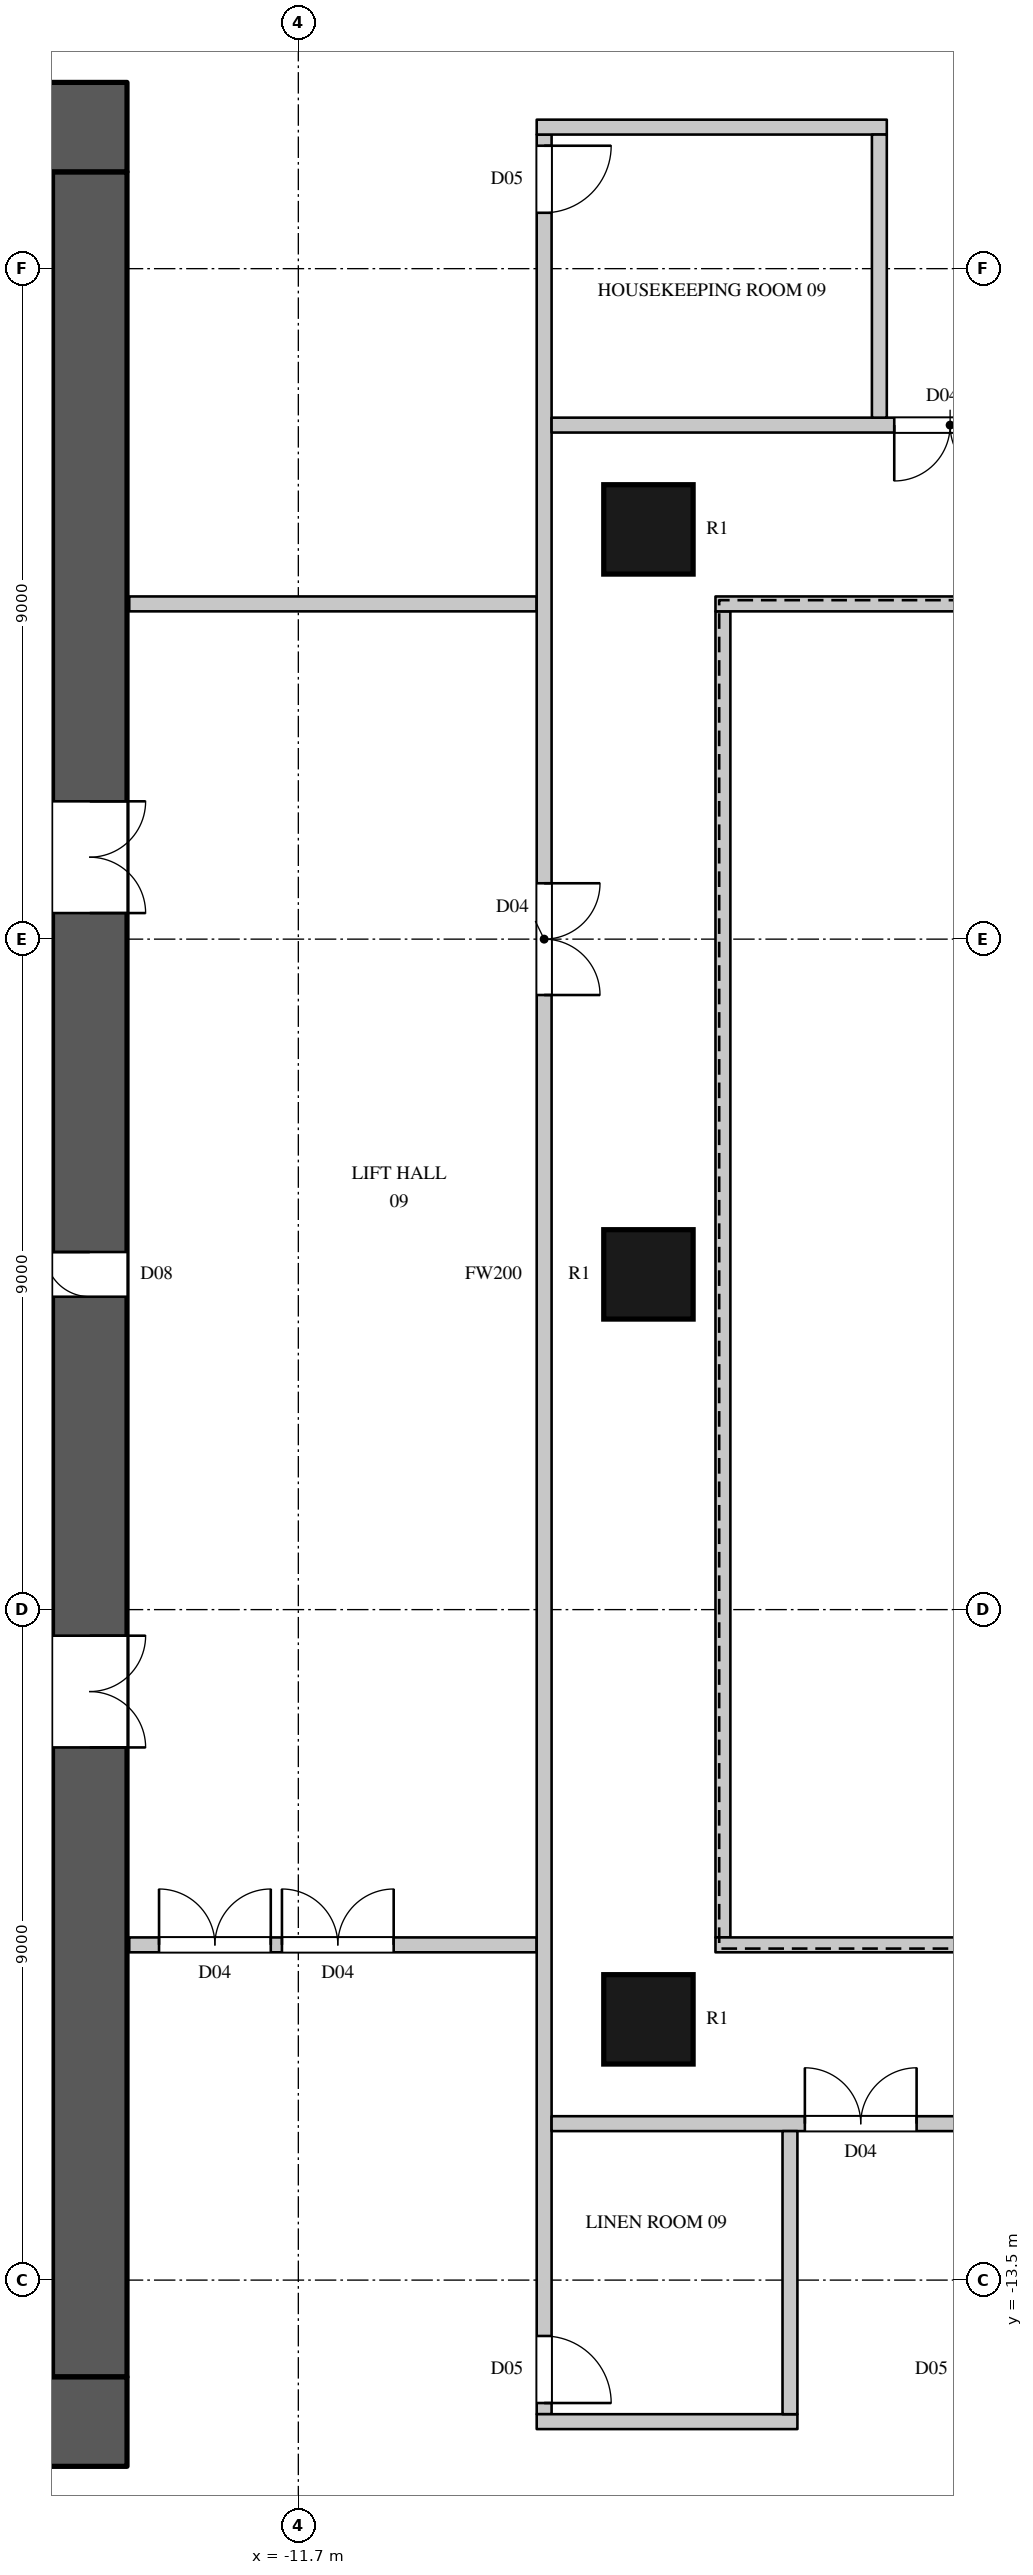
"""IFC4 building model, lengths in metres.
Left out: names, types, materials, properties, quantities, classifications, styles, units other than length and angle.
Written with IfcOpenShell. Run it as: python <this file> out.ifc"""

import sys

from ifc_helpers import new_model, si_unit, direction, frame, frame_2d, origin, origin_2d, place, context, subcontext, project, spatial, rectangle, circle, extrude, element, fill, save


model = new_model("IFC4")
c1 = context("Model", 3, precision=1e-05, world=origin(), true_north=direction((0.0, 1.0)))
c2 = subcontext(c1, "Body", "Model", "MODEL_VIEW")
j1 = project(units=[si_unit("LENGTHUNIT", "METRE"), si_unit("PLANEANGLEUNIT", "RADIAN")], contexts=[c1])
p1 = place(None, origin())
s1 = spatial("IfcSite", under=j1, at=p1, CompositionType="ELEMENT")
p2 = place(p1, origin())
s2 = spatial("IfcBuilding", under=s1, at=p2, CompositionType="ELEMENT")
p3 = place(p2, frame((0.0, 0.0, 62.7)))
s3 = spatial("IfcBuildingStorey", under=s2, at=p3, CompositionType="ELEMENT", Elevation=62.7)
for number, where, z_axis, x_axis in (
    (1, (-7.0, -10.0, 0.0), (0.0, 0.0, 1.0), (1.0, 0.0, 0.0)),
    (2, (-7.0, 0.0, 0.0), (0.0, 0.0, 1.0), (1.0, 0.0, 0.0)),
    (3, (-7.0, 10.0, 0.0), (0.0, 0.0, 1.0), (1.0, 0.0, 0.0)),
):
    element("IfcColumn", number, at=place(p3, frame(where, z_axis=z_axis, x_axis=x_axis)), inside=s3, PredefinedType="COLUMN", context=c2, shape_type="SweptSolid", body=[
        extrude(circle(Radius=0.6, at=origin_2d()), origin(), (0.0, 0.0, 1.0), 3.6),
    ])
p4 = place(p3, frame((-30.0, 15.4, 0.0), z_axis=(0.0, 0.0, 1.0), x_axis=(1.0, 0.0, 0.0)))
e4 = element("IfcWall", 4, at=p4, inside=s3, PredefinedType="SHEAR", context=c2, shape_type="SweptSolid", body=[
    extrude(rectangle(XDim=16.0, YDim=1.2, at=frame_2d((8.0, 0.0))), origin(), (0.0, 0.0, 1.0), 3.6),
])
p5 = place(p4, frame((13.4, 0.0, 0.0)))
e5 = element("IfcOpeningElement", 5, at=p5, cuts=e4, PredefinedType="OPENING", context=c2, shape_type="SweptSolid", body=[
    extrude(rectangle(XDim=1.5, YDim=2.4, at=frame_2d((0.75, 1.2))), frame((0.0, 0.61, 0.0), z_axis=(0.0, -1.0, 0.0), x_axis=(1.0, 0.0, 0.0)), (0.0, 0.0, 1.0), 1.22),
])
p6 = place(p3, frame((-30.0, -15.4, 0.0), z_axis=(0.0, 0.0, 1.0), x_axis=(1.0, 0.0, 0.0)))
e6 = element("IfcWall", 6, at=p6, inside=s3, PredefinedType="SHEAR", context=c2, shape_type="SweptSolid", body=[
    extrude(rectangle(XDim=16.0, YDim=1.2, at=frame_2d((8.0, 0.0))), origin(), (0.0, 0.0, 1.0), 3.6),
])
p7 = place(p6, frame((13.4, 0.0, 0.0)))
e7 = element("IfcOpeningElement", 7, at=p7, cuts=e6, PredefinedType="OPENING", context=c2, shape_type="SweptSolid", body=[
    extrude(rectangle(XDim=1.5, YDim=2.4, at=frame_2d((0.75, 1.2))), frame((0.0, 0.61, 0.0), z_axis=(0.0, -1.0, 0.0), x_axis=(1.0, 0.0, 0.0)), (0.0, 0.0, 1.0), 1.22),
])
p8 = place(p3, frame((-14.5, -14.8, 0.0), z_axis=(0.0, 0.0, 1.0), x_axis=(0.0, 1.0, 0.0)))
e8 = element("IfcWall", 8, at=p8, inside=s3, PredefinedType="SHEAR", context=c2, shape_type="SweptSolid", body=[
    extrude(rectangle(XDim=29.6, YDim=1.0, at=frame_2d((14.8, 0.0))), origin(), (0.0, 0.0, 1.0), 3.6),
])
p9 = place(p8, frame((8.45, 0.0, 0.0)))
e9 = element("IfcOpeningElement", 9, at=p9, cuts=e8, PredefinedType="OPENING", context=c2, shape_type="SweptSolid", body=[
    extrude(rectangle(XDim=1.5, YDim=2.4, at=frame_2d((0.75, 1.2))), frame((0.0, 0.51, 0.0), z_axis=(0.0, -1.0, 0.0), x_axis=(1.0, 0.0, 0.0)), (0.0, 0.0, 1.0), 1.02),
])
p10 = place(p8, frame((19.65, 0.0, 0.0)))
e10 = element("IfcOpeningElement", 10, at=p10, cuts=e8, PredefinedType="OPENING", context=c2, shape_type="SweptSolid", body=[
    extrude(rectangle(XDim=1.5, YDim=2.4, at=frame_2d((0.75, 1.2))), frame((0.0, 0.51, 0.0), z_axis=(0.0, -1.0, 0.0), x_axis=(1.0, 0.0, 0.0)), (0.0, 0.0, 1.0), 1.02),
])
p11 = place(p8, frame((14.5, 0.0, 0.0)))
e11 = element("IfcOpeningElement", 11, at=p11, cuts=e8, PredefinedType="OPENING", context=c2, shape_type="SweptSolid", body=[
    extrude(rectangle(XDim=0.6, YDim=2.0, at=frame_2d((0.3, 1.0))), frame((0.0, 0.51, 0.0), z_axis=(0.0, -1.0, 0.0), x_axis=(1.0, 0.0, 0.0)), (0.0, 0.0, 1.0), 1.02),
])
p12 = place(p3, frame((-13.97, -9.0, 0.0), z_axis=(0.0, 0.0, 1.0), x_axis=(1.0, 0.0, 0.0)))
e12 = element("IfcWall", 12, at=p12, inside=s3, PredefinedType="PARTITIONING", context=c2, shape_type="SweptSolid", body=[
    extrude(rectangle(XDim=5.47, YDim=0.2, at=frame_2d((2.735, 0.0))), origin(), (0.0, 0.0, 1.0), 3.3),
])
p13 = place(p12, frame((0.4, 0.0, 0.0)))
e13 = element("IfcOpeningElement", 13, at=p13, cuts=e12, PredefinedType="OPENING", context=c2, shape_type="SweptSolid", body=[
    extrude(rectangle(XDim=1.5, YDim=2.2, at=frame_2d((0.75, 1.1))), frame((0.0, 0.11, 0.0), z_axis=(0.0, -1.0, 0.0), x_axis=(1.0, 0.0, 0.0)), (0.0, 0.0, 1.0), 0.22),
])
p14 = place(p12, frame((2.05, 0.0, 0.0)))
e14 = element("IfcOpeningElement", 14, at=p14, cuts=e12, PredefinedType="OPENING", context=c2, shape_type="SweptSolid", body=[
    extrude(rectangle(XDim=1.5, YDim=2.2, at=frame_2d((0.75, 1.1))), frame((0.0, 0.11, 0.0), z_axis=(0.0, -1.0, 0.0), x_axis=(1.0, 0.0, 0.0)), (0.0, 0.0, 1.0), 0.22),
])
p15 = place(p3, frame((-13.97, 9.0, 0.0), z_axis=(0.0, 0.0, 1.0), x_axis=(1.0, 0.0, 0.0)))
e15 = element("IfcWall", 15, at=p15, inside=s3, PredefinedType="PARTITIONING", context=c2, shape_type="SweptSolid", body=[
    extrude(rectangle(XDim=5.47, YDim=0.2, at=frame_2d((2.735, 0.0))), origin(), (0.0, 0.0, 1.0), 3.3),
])
p16 = place(p3, frame((-8.4, -15.3, 0.0), z_axis=(0.0, 0.0, 1.0), x_axis=(0.0, 1.0, 0.0)))
e16 = element("IfcWall", 16, at=p16, inside=s3, PredefinedType="PARTITIONING", context=c2, shape_type="SweptSolid", body=[
    extrude(rectangle(XDim=30.6, YDim=0.2, at=frame_2d((15.3, 0.0))), origin(), (0.0, 0.0, 1.0), 3.3),
])
p17 = place(p16, frame((19.05, 0.0, 0.0)))
e17 = element("IfcOpeningElement", 17, at=p17, cuts=e16, PredefinedType="OPENING", context=c2, shape_type="SweptSolid", body=[
    extrude(rectangle(XDim=1.5, YDim=2.2, at=frame_2d((0.75, 1.1))), frame((0.0, 0.11, 0.0), z_axis=(0.0, -1.0, 0.0), x_axis=(1.0, 0.0, 0.0)), (0.0, 0.0, 1.0), 0.22),
])
p18 = place(p16, frame((29.55, 0.0, 0.0)))
e18 = element("IfcOpeningElement", 18, at=p18, cuts=e16, PredefinedType="OPENING", context=c2, shape_type="SweptSolid", body=[
    extrude(rectangle(XDim=0.9, YDim=2.2, at=frame_2d((0.45, 1.1))), frame((0.0, 0.11, 0.0), z_axis=(0.0, -1.0, 0.0), x_axis=(1.0, 0.0, 0.0)), (0.0, 0.0, 1.0), 0.22),
])
p19 = place(p16, frame((0.15, 0.0, 0.0)))
e19 = element("IfcOpeningElement", 19, at=p19, cuts=e16, PredefinedType="OPENING", context=c2, shape_type="SweptSolid", body=[
    extrude(rectangle(XDim=0.9, YDim=2.2, at=frame_2d((0.45, 1.1))), frame((0.0, 0.11, 0.0), z_axis=(0.0, -1.0, 0.0), x_axis=(1.0, 0.0, 0.0)), (0.0, 0.0, 1.0), 0.22),
])
p20 = place(p3, frame((-8.5, -15.4, 0.0), z_axis=(0.0, 0.0, 1.0), x_axis=(1.0, 0.0, 0.0)))
e20 = element("IfcWall", 20, at=p20, inside=s3, PredefinedType="PARTITIONING", context=c2, shape_type="SweptSolid", body=[
    extrude(rectangle(XDim=3.5, YDim=0.2, at=frame_2d((1.75, 0.0))), origin(), (0.0, 0.0, 1.0), 3.3),
])
p21 = place(p3, frame((-8.3, -11.4, 0.0), z_axis=(0.0, 0.0, 1.0), x_axis=(1.0, 0.0, 0.0)))
e21 = element("IfcWall", 21, at=p21, inside=s3, PredefinedType="PARTITIONING", context=c2, shape_type="SweptSolid", body=[
    extrude(rectangle(XDim=18.7, YDim=0.2, at=frame_2d((9.35, 0.0))), origin(), (0.0, 0.0, 1.0), 3.3),
])
p22 = place(p21, frame((3.4, 0.0, 0.0)))
e22 = element("IfcOpeningElement", 22, at=p22, cuts=e21, PredefinedType="OPENING", context=c2, shape_type="SweptSolid", body=[
    extrude(rectangle(XDim=1.5, YDim=2.2, at=frame_2d((0.75, 1.1))), frame((0.0, 0.11, 0.0), z_axis=(0.0, -1.0, 0.0), x_axis=(1.0, 0.0, 0.0)), (0.0, 0.0, 1.0), 0.22),
])
p23 = place(p3, frame((-8.3, 11.4, 0.0), z_axis=(0.0, 0.0, 1.0), x_axis=(1.0, 0.0, 0.0)))
e23 = element("IfcWall", 23, at=p23, inside=s3, PredefinedType="PARTITIONING", context=c2, shape_type="SweptSolid", body=[
    extrude(rectangle(XDim=18.7, YDim=0.2, at=frame_2d((9.35, 0.0))), origin(), (0.0, 0.0, 1.0), 3.3),
])
p24 = place(p23, frame((4.6, 0.0, 0.0)))
e24 = element("IfcOpeningElement", 24, at=p24, cuts=e23, PredefinedType="OPENING", context=c2, shape_type="SweptSolid", body=[
    extrude(rectangle(XDim=1.5, YDim=2.2, at=frame_2d((0.75, 1.1))), frame((0.0, 0.11, 0.0), z_axis=(0.0, -1.0, 0.0), x_axis=(1.0, 0.0, 0.0)), (0.0, 0.0, 1.0), 0.22),
])
p25 = place(p3, frame((-8.5, 15.4, 0.0), z_axis=(0.0, 0.0, 1.0), x_axis=(1.0, 0.0, 0.0)))
e25 = element("IfcWall", 25, at=p25, inside=s3, PredefinedType="PARTITIONING", context=c2, shape_type="SweptSolid", body=[
    extrude(rectangle(XDim=4.7, YDim=0.2, at=frame_2d((2.35, 0.0))), origin(), (0.0, 0.0, 1.0), 3.3),
])
p26 = place(p3, frame((-6.0, -8.9, 0.0), z_axis=(0.0, 0.0, 1.0), x_axis=(0.0, 1.0, 0.0)))
e26 = element("IfcWall", 26, at=p26, inside=s3, PredefinedType="PARTITIONING", context=c2, shape_type="SweptSolid", body=[
    extrude(rectangle(XDim=17.8, YDim=0.2, at=frame_2d((8.9, 0.0))), origin(), (0.0, 0.0, 1.0), 3.3),
])
for number, where, z_axis, x_axis in (
    (27, (-6.1, -9.0, 0.0), (0.0, 0.0, 1.0), (1.0, 0.0, 0.0)),
    (28, (-6.1, 9.0, 0.0), (0.0, 0.0, 1.0), (1.0, 0.0, 0.0)),
):
    element("IfcWall", number, at=place(p3, frame(where, z_axis=z_axis, x_axis=x_axis)), inside=s3, PredefinedType="PARTITIONING", context=c2, shape_type="SweptSolid", body=[
        extrude(rectangle(XDim=14.2, YDim=0.2, at=frame_2d((7.1, 0.0))), origin(), (0.0, 0.0, 1.0), 3.3),
    ])
for number, where, z_axis, x_axis in (
    (29, (-5.1, -15.3, 0.0), (0.0, 0.0, 1.0), (0.0, 1.0, 0.0)),
    (30, (-3.9, 11.5, 0.0), (0.0, 0.0, 1.0), (0.0, 1.0, 0.0)),
):
    element("IfcWall", number, at=place(p3, frame(where, z_axis=z_axis, x_axis=x_axis)), inside=s3, PredefinedType="PARTITIONING", context=c2, shape_type="SweptSolid", body=[
        extrude(rectangle(XDim=3.8, YDim=0.2, at=frame_2d((1.9, 0.0))), origin(), (0.0, 0.0, 1.0), 3.3),
    ])
p27 = place(p17, origin())
e31 = element("IfcDoor", 31, at=p27, inside=s3, OperationType="DOUBLE_DOOR_SINGLE_SWING", PredefinedType="DOOR", context=c2, shape_type="SweptSolid", body=[
    extrude(rectangle(XDim=1.5, YDim=2.2, at=frame_2d((0.75, 1.1))), frame((0.0, 0.025, 0.0), z_axis=(0.0, -1.0, 0.0), x_axis=(1.0, 0.0, 0.0)), (0.0, 0.0, 1.0), 0.05),
])
fill(e17, e31)
p28 = place(p13, origin())
e32 = element("IfcDoor", 32, at=p28, inside=s3, OperationType="DOUBLE_DOOR_SINGLE_SWING", PredefinedType="DOOR", context=c2, shape_type="SweptSolid", body=[
    extrude(rectangle(XDim=1.5, YDim=2.2, at=frame_2d((0.75, 1.1))), frame((0.0, 0.025, 0.0), z_axis=(0.0, -1.0, 0.0), x_axis=(1.0, 0.0, 0.0)), (0.0, 0.0, 1.0), 0.05),
])
fill(e13, e32)
p29 = place(p14, origin())
e33 = element("IfcDoor", 33, at=p29, inside=s3, OperationType="DOUBLE_DOOR_SINGLE_SWING", PredefinedType="DOOR", context=c2, shape_type="SweptSolid", body=[
    extrude(rectangle(XDim=1.5, YDim=2.2, at=frame_2d((0.75, 1.1))), frame((0.0, 0.025, 0.0), z_axis=(0.0, -1.0, 0.0), x_axis=(1.0, 0.0, 0.0)), (0.0, 0.0, 1.0), 0.05),
])
fill(e14, e33)
p30 = place(p22, origin())
e34 = element("IfcDoor", 34, at=p30, inside=s3, OperationType="DOUBLE_DOOR_SINGLE_SWING", PredefinedType="DOOR", context=c2, shape_type="SweptSolid", body=[
    extrude(rectangle(XDim=1.5, YDim=2.2, at=frame_2d((0.75, 1.1))), frame((0.0, 0.025, 0.0), z_axis=(0.0, -1.0, 0.0), x_axis=(1.0, 0.0, 0.0)), (0.0, 0.0, 1.0), 0.05),
])
fill(e22, e34)
p31 = place(p24, origin())
e35 = element("IfcDoor", 35, at=p31, inside=s3, OperationType="DOUBLE_DOOR_SINGLE_SWING", PredefinedType="DOOR", context=c2, shape_type="SweptSolid", body=[
    extrude(rectangle(XDim=1.5, YDim=2.2, at=frame_2d((0.75, 1.1))), frame((0.0, 0.025, 0.0), z_axis=(0.0, -1.0, 0.0), x_axis=(1.0, 0.0, 0.0)), (0.0, 0.0, 1.0), 0.05),
])
fill(e24, e35)
p32 = place(p18, origin())
e36 = element("IfcDoor", 36, at=p32, inside=s3, OperationType="SINGLE_SWING_LEFT", PredefinedType="DOOR", context=c2, shape_type="SweptSolid", body=[
    extrude(rectangle(XDim=0.9, YDim=2.2, at=frame_2d((0.45, 1.1))), frame((0.0, 0.025, 0.0), z_axis=(0.0, -1.0, 0.0), x_axis=(1.0, 0.0, 0.0)), (0.0, 0.0, 1.0), 0.05),
])
fill(e18, e36)
p33 = place(p19, origin())
e37 = element("IfcDoor", 37, at=p33, inside=s3, OperationType="SINGLE_SWING_RIGHT", PredefinedType="DOOR", context=c2, shape_type="SweptSolid", body=[
    extrude(rectangle(XDim=0.9, YDim=2.2, at=frame_2d((0.45, 1.1))), frame((0.0, 0.025, 0.0), z_axis=(0.0, -1.0, 0.0), x_axis=(1.0, 0.0, 0.0)), (0.0, 0.0, 1.0), 0.05),
])
fill(e19, e37)
p34 = place(p9, origin())
e38 = element("IfcDoor", 38, at=p34, inside=s3, OperationType="DOUBLE_DOOR_SINGLE_SWING", PredefinedType="DOOR", context=c2, shape_type="SweptSolid", body=[
    extrude(rectangle(XDim=1.5, YDim=2.4, at=frame_2d((0.75, 1.2))), frame((0.0, -0.445, 0.0), z_axis=(0.0, -1.0, 0.0), x_axis=(1.0, 0.0, 0.0)), (0.0, 0.0, 1.0), 0.05),
])
fill(e9, e38)
p35 = place(p10, origin())
e39 = element("IfcDoor", 39, at=p35, inside=s3, OperationType="DOUBLE_DOOR_SINGLE_SWING", PredefinedType="DOOR", context=c2, shape_type="SweptSolid", body=[
    extrude(rectangle(XDim=1.5, YDim=2.4, at=frame_2d((0.75, 1.2))), frame((0.0, -0.445, 0.0), z_axis=(0.0, -1.0, 0.0), x_axis=(1.0, 0.0, 0.0)), (0.0, 0.0, 1.0), 0.05),
])
fill(e10, e39)
p36 = place(p11, origin())
e40 = element("IfcDoor", 40, at=p36, inside=s3, OperationType="SINGLE_SWING_RIGHT", PredefinedType="DOOR", context=c2, shape_type="SweptSolid", body=[
    extrude(rectangle(XDim=0.6, YDim=2.0, at=frame_2d((0.3, 1.0))), frame((0.0, 0.495, 0.0), z_axis=(0.0, -1.0, 0.0), x_axis=(1.0, 0.0, 0.0)), (0.0, 0.0, 1.0), 0.05),
])
fill(e11, e40)
save(model, sys.argv[1])
